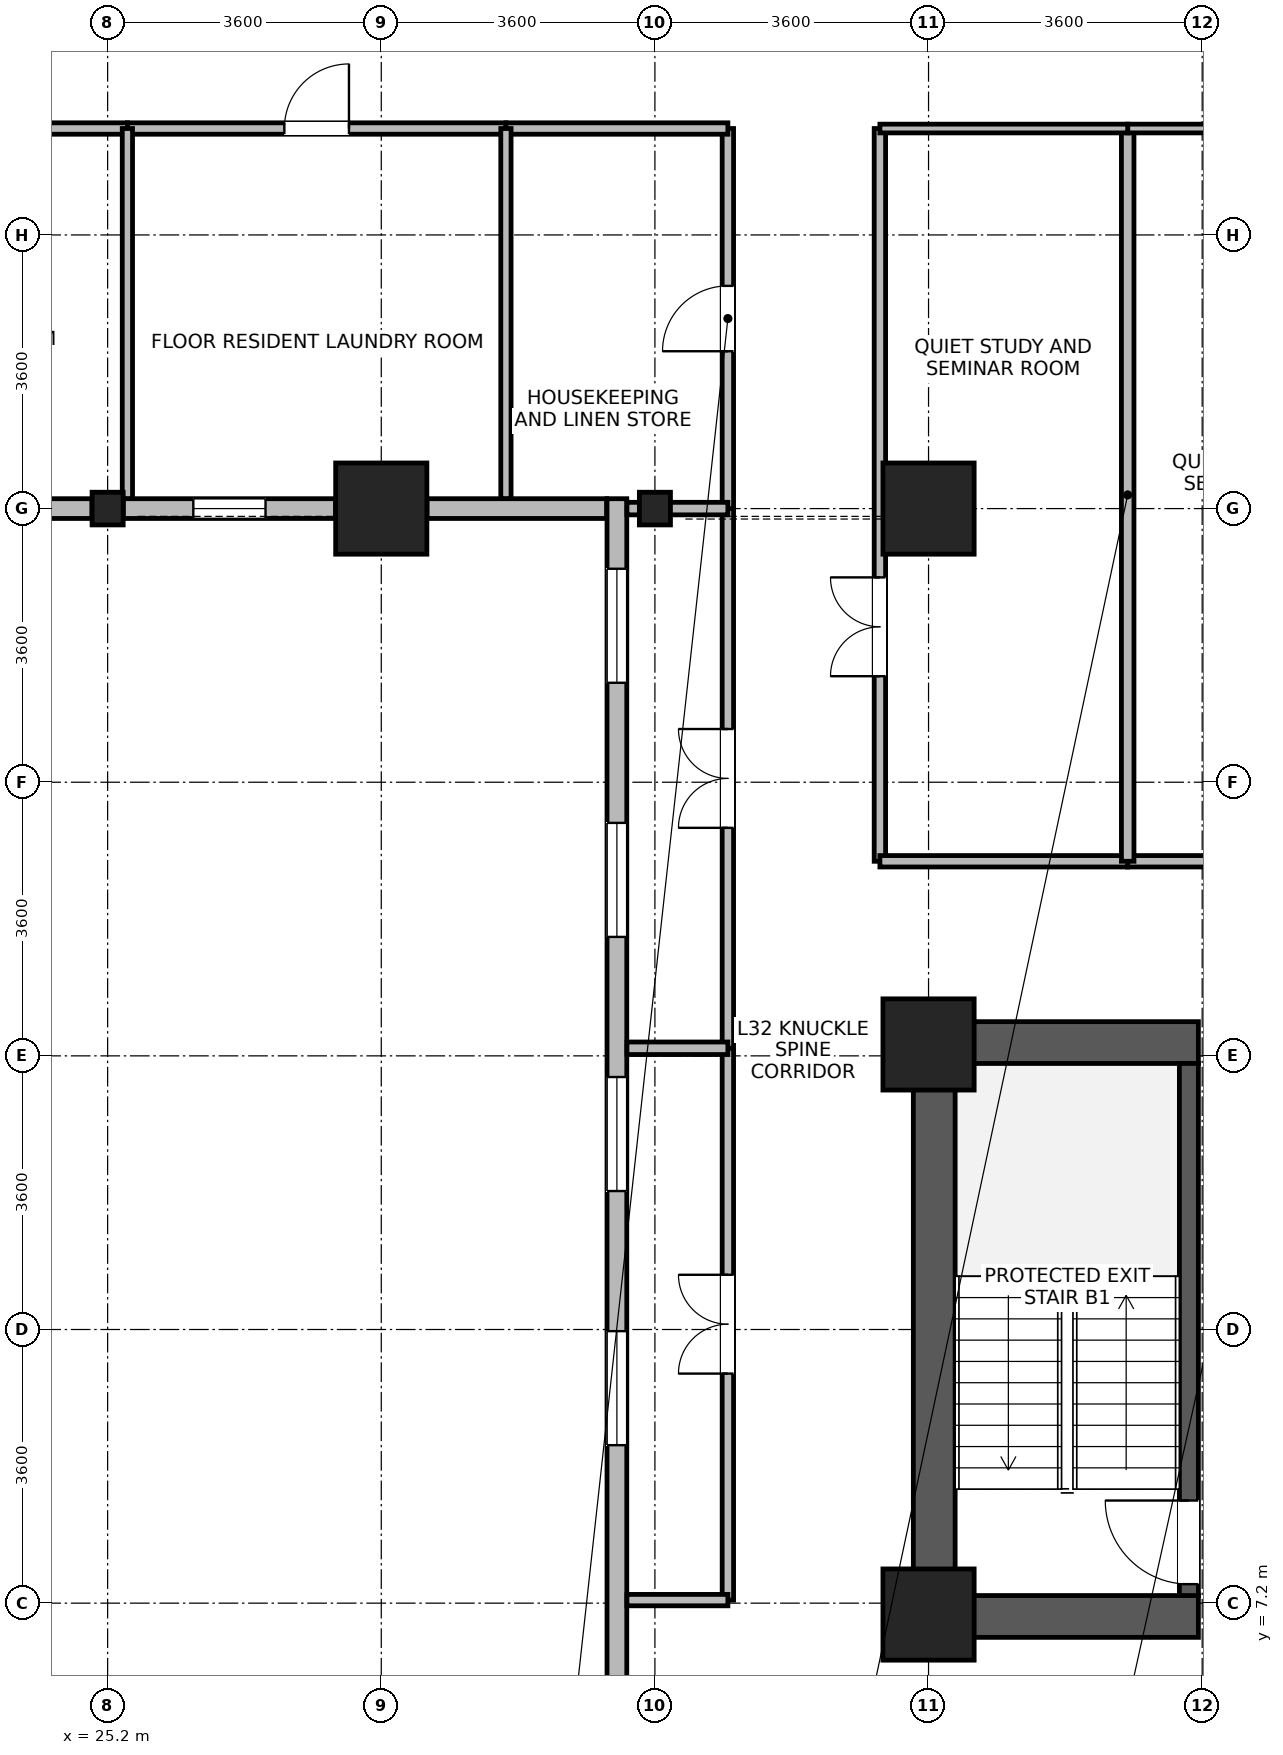
"""IFC4 building model, lengths in metres.
Left out: names, types, materials, properties, quantities, classifications, styles, units other than length and angle.
Written with IfcOpenShell. Run it as: python <this file> out.ifc"""

import sys

from ifc_helpers import new_model, si_unit, direction, frame, frame_2d, origin, origin_2d, place, context, subcontext, project, spatial, rectangle, i_section, extrude, source, transform, mapped, element, fill, save


model = new_model("IFC4")
c1 = context("Model", 3, precision=1e-05, world=origin(), true_north=direction((0.0, 1.0)))
c2 = subcontext(c1, "Body", "Model", "MODEL_VIEW")
j1 = project(units=[si_unit("LENGTHUNIT", "METRE"), si_unit("PLANEANGLEUNIT", "RADIAN")], contexts=[c1])
p1 = place(None, origin())
s1 = spatial("IfcSite", under=j1, at=p1, CompositionType="ELEMENT")
p2 = place(p1, origin())
s2 = spatial("IfcBuilding", under=s1, at=p2, CompositionType="ELEMENT")
p3 = place(p2, frame((0.0, 0.0, 126.7)))
s3 = spatial("IfcBuildingStorey", under=s2, at=p3, CompositionType="ELEMENT", Elevation=126.7)
p4 = place(p3, frame((36.075, 6.75, 0.0), z_axis=(0.0, 0.0, 1.0), x_axis=(0.0, 1.0, 0.0)))
e1 = element("IfcWall", 1, at=p4, inside=s3, PredefinedType="SHEAR", context=c2, shape_type="SweptSolid", body=[
    extrude(rectangle(XDim=8.1, YDim=0.55, at=frame_2d((4.05, 0.0))), origin(), (0.0, 0.0, 1.0), 3.34),
])
for number, where, z_axis, x_axis in (
    (2, (36.35, 7.025, 0.0), (0.0, 0.0, 1.0), (1.0, 0.0, 0.0)),
    (3, (36.35, 14.575, 0.0), (0.0, 0.0, 1.0), (1.0, 0.0, 0.0)),
):
    element("IfcWall", number, at=place(p3, frame(where, z_axis=z_axis, x_axis=x_axis)), inside=s3, PredefinedType="SHEAR", context=c2, shape_type="SweptSolid", body=[
        extrude(rectangle(XDim=3.2, YDim=0.55, at=frame_2d((1.6, 0.0))), origin(), (0.0, 0.0, 1.0), 3.34),
    ])
p5 = place(p3, frame((39.425, 7.3, 0.0), z_axis=(0.0, 0.0, 1.0), x_axis=(0.0, 1.0, 0.0)))
e4 = element("IfcWall", 4, at=p5, inside=s3, PredefinedType="SHEAR", context=c2, shape_type="SweptSolid", body=[
    extrude(rectangle(XDim=7.0, YDim=0.25, at=frame_2d((3.5, 0.0))), origin(), (0.0, 0.0, 1.0), 3.34),
])
p6 = place(p5, frame((0.15, 0.0, 0.0)))
e5 = element("IfcOpeningElement", 5, at=p6, cuts=e4, PredefinedType="OPENING", context=c2, shape_type="SweptSolid", body=[
    extrude(rectangle(XDim=1.1, YDim=2.08, at=frame_2d((0.55, 1.04))), frame((0.0, 0.135, 0.0), z_axis=(0.0, -1.0, 0.0), x_axis=(1.0, 0.0, 0.0)), (0.0, 0.0, 1.0), 0.27),
])
m1 = source(origin(), c2, "Body", "SweptSolid", [
    extrude(rectangle(XDim=1.2, YDim=1.2, at=origin_2d()), origin(), (0.0, 0.0, 1.0), 3.7),
])
for number, where, z_axis, x_axis in (
    (6, (28.8, 21.6, 0.0), (0.0, 0.0, 1.0), (1.0, 0.0, 0.0)),
    (7, (36.0, 21.6, 0.0), (0.0, 0.0, 1.0), (1.0, 0.0, 0.0)),
    (8, (36.0, 7.05, 0.0), (0.0, 0.0, 1.0), (1.0, 0.0, 0.0)),
    (9, (36.0, 14.55, 0.0), (0.0, 0.0, 1.0), (1.0, 0.0, 0.0)),
):
    element("IfcColumn", number, at=place(p3, frame(where, z_axis=z_axis, x_axis=x_axis)), inside=s3, PredefinedType="COLUMN", context=c2, shape_type="MappedRepresentation", body=[
        mapped(m1, transform((0.0, 0.0, 0.0), x_axis=(1.0, 0.0, 0.0), y_axis=(0.0, 1.0, 0.0), z_axis=(0.0, 0.0, 1.0), scale=1.0)),
    ])
m2 = source(origin(), c2, "Body", "SweptSolid", [
    extrude(i_section(OverallWidth=0.409, OverallDepth=0.43, WebThickness=0.024, FlangeThickness=0.033, FilletRadius=0.015, at=origin_2d()), origin(), (0.0, 0.0, 1.0), 3.7),
])
for number, where, z_axis, x_axis in (
    (10, (25.2, 21.6, 0.0), (0.0, 0.0, 1.0), (1.0, 0.0, 0.0)),
    (11, (32.4, 21.6, 0.0), (0.0, 0.0, 1.0), (1.0, 0.0, 0.0)),
):
    element("IfcColumn", number, at=place(p3, frame(where, z_axis=z_axis, x_axis=x_axis)), inside=s3, PredefinedType="COLUMN", context=c2, shape_type="MappedRepresentation", body=[
        mapped(m2, transform((0.0, 0.0, 0.0), x_axis=(1.0, 0.0, 0.0), y_axis=(0.0, 1.0, 0.0), z_axis=(0.0, 0.0, 1.0), scale=1.0)),
    ])
p7 = place(p3, frame((24.994, 21.6, 0.0), z_axis=(0.0, 0.0, 1.0), x_axis=(-1.0, 0.0, 0.0)))
e12 = element("IfcWall", 12, at=p7, inside=s3, PredefinedType="STANDARD", context=c2, shape_type="SweptSolid", body=[
    extrude(rectangle(XDim=2.793, YDim=0.26, at=frame_2d((1.397, 0.0))), origin(), (0.0, 0.0, 1.0), 2.87),
])
p8 = place(p7, frame((0.922, 0.0, 0.85)))
e13 = element("IfcOpeningElement", 13, at=p8, cuts=e12, PredefinedType="OPENING", context=c2, shape_type="SweptSolid", body=[
    extrude(rectangle(XDim=0.95, YDim=1.75, at=frame_2d((0.475, 0.875))), frame((0.0, 0.14, 0.0), z_axis=(0.0, -1.0, 0.0), x_axis=(1.0, 0.0, 0.0)), (0.0, 0.0, 1.0), 0.28),
])
p9 = place(p3, frame((28.199, 21.6, 0.0), z_axis=(0.0, 0.0, 1.0), x_axis=(-1.0, 0.0, 0.0)))
e14 = element("IfcWall", 14, at=p9, inside=s3, PredefinedType="STANDARD", context=c2, shape_type="SweptSolid", body=[
    extrude(rectangle(XDim=2.793, YDim=0.26, at=frame_2d((1.397, 0.0))), origin(), (0.0, 0.0, 1.0), 2.87),
])
p10 = place(p9, frame((0.922, 0.0, 0.85)))
e15 = element("IfcOpeningElement", 15, at=p10, cuts=e14, PredefinedType="OPENING", context=c2, shape_type="SweptSolid", body=[
    extrude(rectangle(XDim=0.95, YDim=1.75, at=frame_2d((0.475, 0.875))), frame((0.0, 0.14, 0.0), z_axis=(0.0, -1.0, 0.0), x_axis=(1.0, 0.0, 0.0)), (0.0, 0.0, 1.0), 0.28),
])
p11 = place(p3, frame((31.765, 21.6, 0.0), z_axis=(0.0, 0.0, 1.0), x_axis=(-1.0, 0.0, 0.0)))
e16 = element("IfcWall", 16, at=p11, inside=s3, PredefinedType="STANDARD", context=c2, shape_type="SweptSolid", body=[
    extrude(rectangle(XDim=2.364, YDim=0.26, at=frame_2d((1.182, 0.0))), origin(), (0.0, 0.0, 1.0), 2.87),
])
p12 = place(p3, frame((31.9, 1.67, 0.0), z_axis=(0.0, 0.0, 1.0), x_axis=(0.0, 1.0, 0.0)))
e17 = element("IfcWall", 17, at=p12, inside=s3, PredefinedType="STANDARD", context=c2, shape_type="SweptSolid", body=[
    extrude(rectangle(XDim=20.06, YDim=0.26, at=frame_2d((10.03, 0.0))), origin(), (0.0, 0.0, 1.0), 3.32),
])
p13 = place(p12, frame((0.922, 0.0, 0.85)))
e18 = element("IfcOpeningElement", 18, at=p13, cuts=e17, PredefinedType="OPENING", context=c2, shape_type="SweptSolid", body=[
    extrude(rectangle(XDim=1.5, YDim=1.85, at=frame_2d((0.75, 0.925))), frame((0.0, 0.14, 0.0), z_axis=(0.0, -1.0, 0.0), x_axis=(1.0, 0.0, 0.0)), (0.0, 0.0, 1.0), 0.28),
])
p14 = place(p12, frame((7.608, 0.0, 0.85)))
e19 = element("IfcOpeningElement", 19, at=p14, cuts=e17, PredefinedType="OPENING", context=c2, shape_type="SweptSolid", body=[
    extrude(rectangle(XDim=1.5, YDim=1.85, at=frame_2d((0.75, 0.925))), frame((0.0, 0.14, 0.0), z_axis=(0.0, -1.0, 0.0), x_axis=(1.0, 0.0, 0.0)), (0.0, 0.0, 1.0), 0.28),
])
p15 = place(p12, frame((10.952, 0.0, 0.85)))
e20 = element("IfcOpeningElement", 20, at=p15, cuts=e17, PredefinedType="OPENING", context=c2, shape_type="SweptSolid", body=[
    extrude(rectangle(XDim=1.5, YDim=1.85, at=frame_2d((0.75, 0.925))), frame((0.0, 0.14, 0.0), z_axis=(0.0, -1.0, 0.0), x_axis=(1.0, 0.0, 0.0)), (0.0, 0.0, 1.0), 0.28),
])
p16 = place(p12, frame((14.295, 0.0, 0.85)))
e21 = element("IfcOpeningElement", 21, at=p16, cuts=e17, PredefinedType="OPENING", context=c2, shape_type="SweptSolid", body=[
    extrude(rectangle(XDim=1.5, YDim=1.85, at=frame_2d((0.75, 0.925))), frame((0.0, 0.14, 0.0), z_axis=(0.0, -1.0, 0.0), x_axis=(1.0, 0.0, 0.0)), (0.0, 0.0, 1.0), 0.28),
])
p17 = place(p12, frame((17.638, 0.0, 0.85)))
e22 = element("IfcOpeningElement", 22, at=p17, cuts=e17, PredefinedType="OPENING", context=c2, shape_type="SweptSolid", body=[
    extrude(rectangle(XDim=1.5, YDim=1.85, at=frame_2d((0.75, 0.925))), frame((0.0, 0.14, 0.0), z_axis=(0.0, -1.0, 0.0), x_axis=(1.0, 0.0, 0.0)), (0.0, 0.0, 1.0), 0.28),
])
p18 = place(p3, frame((35.36, 16.96, 0.0), z_axis=(0.0, 0.0, 1.0), x_axis=(0.0, 1.0, 0.0)))
e23 = element("IfcWall", 23, at=p18, inside=s3, PredefinedType="PARTITIONING", context=c2, shape_type="SweptSolid", body=[
    extrude(rectangle(XDim=9.64, YDim=0.15, at=frame_2d((4.82, 0.0))), origin(), (0.0, 0.0, 1.0), 3.32),
])
p19 = place(p18, frame((2.435, 0.0, 0.0)))
e24 = element("IfcOpeningElement", 24, at=p19, cuts=e23, PredefinedType="OPENING", context=c2, shape_type="SweptSolid", body=[
    extrude(rectangle(XDim=1.3, YDim=2.12, at=frame_2d((0.65, 1.06))), frame((0.0, 0.085, 0.0), z_axis=(0.0, -1.0, 0.0), x_axis=(1.0, 0.0, 0.0)), (0.0, 0.0, 1.0), 0.17),
])
p20 = place(p3, frame((33.36, 7.24, 0.0), z_axis=(0.0, 0.0, 1.0), x_axis=(0.0, 1.0, 0.0)))
e25 = element("IfcWall", 25, at=p20, inside=s3, PredefinedType="PARTITIONING", context=c2, shape_type="SweptSolid", body=[
    extrude(rectangle(XDim=7.26, YDim=0.15, at=frame_2d((3.63, 0.0))), origin(), (0.0, 0.0, 1.0), 3.32),
])
p21 = place(p20, frame((2.98, 0.0, 0.0)))
e26 = element("IfcOpeningElement", 26, at=p21, cuts=e25, PredefinedType="OPENING", context=c2, shape_type="SweptSolid", body=[
    extrude(rectangle(XDim=1.3, YDim=2.12, at=frame_2d((0.65, 1.06))), frame((0.0, 0.085, 0.0), z_axis=(0.0, -1.0, 0.0), x_axis=(1.0, 0.0, 0.0)), (0.0, 0.0, 1.0), 0.17),
])
p22 = place(p3, frame((33.36, 14.5, 0.0), z_axis=(0.0, 0.0, 1.0), x_axis=(0.0, 1.0, 0.0)))
e27 = element("IfcWall", 27, at=p22, inside=s3, PredefinedType="PARTITIONING", context=c2, shape_type="SweptSolid", body=[
    extrude(rectangle(XDim=7.1, YDim=0.15, at=frame_2d((3.55, 0.0))), origin(), (0.0, 0.0, 1.0), 3.32),
])
p23 = place(p22, frame((2.9, 0.0, 0.0)))
e28 = element("IfcOpeningElement", 28, at=p23, cuts=e27, PredefinedType="OPENING", context=c2, shape_type="SweptSolid", body=[
    extrude(rectangle(XDim=1.3, YDim=2.12, at=frame_2d((0.65, 1.06))), frame((0.0, 0.085, 0.0), z_axis=(0.0, -1.0, 0.0), x_axis=(1.0, 0.0, 0.0)), (0.0, 0.0, 1.0), 0.17),
])
p24 = place(p3, frame((19.12, 26.6, 0.0), z_axis=(0.0, 0.0, 1.0), x_axis=(1.0, 0.0, 0.0)))
e29 = element("IfcWall", 29, at=p24, inside=s3, PredefinedType="PARTITIONING", context=c2, shape_type="SweptSolid", body=[
    extrude(rectangle(XDim=6.34, YDim=0.15, at=frame_2d((3.17, 0.0))), origin(), (0.0, 0.0, 1.0), 3.32),
])
p25 = place(p24, frame((2.52, 0.0, 0.0)))
e30 = element("IfcOpeningElement", 30, at=p25, cuts=e29, PredefinedType="OPENING", context=c2, shape_type="SweptSolid", body=[
    extrude(rectangle(XDim=1.3, YDim=2.12, at=frame_2d((0.65, 1.06))), frame((0.0, 0.085, 0.0), z_axis=(0.0, -1.0, 0.0), x_axis=(1.0, 0.0, 0.0)), (0.0, 0.0, 1.0), 0.17),
])
p26 = place(p3, frame((33.36, 21.6, 0.0), z_axis=(0.0, 0.0, 1.0), x_axis=(0.0, 1.0, 0.0)))
e31 = element("IfcWall", 31, at=p26, inside=s3, PredefinedType="PARTITIONING", context=c2, shape_type="SweptSolid", body=[
    extrude(rectangle(XDim=5.0, YDim=0.15, at=frame_2d((2.5, 0.0))), origin(), (0.0, 0.0, 1.0), 3.32),
])
p27 = place(p26, frame((2.07, 0.0, 0.0)))
e32 = element("IfcOpeningElement", 32, at=p27, cuts=e31, PredefinedType="OPENING", context=c2, shape_type="SweptSolid", body=[
    extrude(rectangle(XDim=0.86, YDim=2.02, at=frame_2d((0.43, 1.01))), frame((0.0, 0.085, 0.0), z_axis=(0.0, -1.0, 0.0), x_axis=(1.0, 0.0, 0.0)), (0.0, 0.0, 1.0), 0.17),
])
p28 = place(p3, frame((25.46, 26.6, 0.0), z_axis=(0.0, 0.0, 1.0), x_axis=(1.0, 0.0, 0.0)))
e33 = element("IfcWall", 33, at=p28, inside=s3, PredefinedType="PARTITIONING", context=c2, shape_type="SweptSolid", body=[
    extrude(rectangle(XDim=4.98, YDim=0.15, at=frame_2d((2.49, 0.0))), origin(), (0.0, 0.0, 1.0), 3.32),
])
p29 = place(p28, frame((2.065, 0.0, 0.0)))
e34 = element("IfcOpeningElement", 34, at=p29, cuts=e33, PredefinedType="OPENING", context=c2, shape_type="SweptSolid", body=[
    extrude(rectangle(XDim=0.85, YDim=2.04, at=frame_2d((0.425, 1.02))), frame((0.0, 0.085, 0.0), z_axis=(0.0, -1.0, 0.0), x_axis=(1.0, 0.0, 0.0)), (0.0, 0.0, 1.0), 0.17),
])
p30 = place(p3, frame((38.62, 16.96, 0.0), z_axis=(0.0, 0.0, 1.0), x_axis=(1.0, 0.0, 0.0)))
e35 = element("IfcWall", 35, at=p30, inside=s3, PredefinedType="PARTITIONING", context=c2, shape_type="SweptSolid", body=[
    extrude(rectangle(XDim=3.52, YDim=0.15, at=frame_2d((1.76, 0.0))), origin(), (0.0, 0.0, 1.0), 3.32),
])
p31 = place(p30, frame((1.11, 0.0, 0.0)))
e36 = element("IfcOpeningElement", 36, at=p31, cuts=e35, PredefinedType="OPENING", context=c2, shape_type="SweptSolid", body=[
    extrude(rectangle(XDim=1.3, YDim=2.12, at=frame_2d((0.65, 1.06))), frame((0.0, 0.085, 0.0), z_axis=(0.0, -1.0, 0.0), x_axis=(1.0, 0.0, 0.0)), (0.0, 0.0, 1.0), 0.17),
])
p32 = place(p3, frame((35.36, 16.96, 0.0), z_axis=(0.0, 0.0, 1.0), x_axis=(1.0, 0.0, 0.0)))
e37 = element("IfcWall", 37, at=p32, inside=s3, PredefinedType="PARTITIONING", context=c2, shape_type="SweptSolid", body=[
    extrude(rectangle(XDim=3.26, YDim=0.15, at=frame_2d((1.63, 0.0))), origin(), (0.0, 0.0, 1.0), 3.32),
])
p33 = place(p3, frame((30.44, 26.6, 0.0), z_axis=(0.0, 0.0, 1.0), x_axis=(1.0, 0.0, 0.0)))
e38 = element("IfcWall", 38, at=p33, inside=s3, PredefinedType="PARTITIONING", context=c2, shape_type="SweptSolid", body=[
    extrude(rectangle(XDim=2.92, YDim=0.15, at=frame_2d((1.46, 0.0))), origin(), (0.0, 0.0, 1.0), 3.32),
])
p34 = place(p3, frame((32.032, 7.24, 0.0), z_axis=(0.0, 0.0, 1.0), x_axis=(1.0, 0.0, 0.0)))
e39 = element("IfcWall", 39, at=p34, inside=s3, PredefinedType="PARTITIONING", context=c2, shape_type="SweptSolid", body=[
    extrude(rectangle(XDim=1.328, YDim=0.15, at=frame_2d((0.664, 0.0))), origin(), (0.0, 0.0, 1.0), 3.32),
])
p35 = place(p3, frame((38.62, 16.96, 0.0), z_axis=(0.0, 0.0, 1.0), x_axis=(0.0, 1.0, 0.0)))
e40 = element("IfcWall", 40, at=p35, inside=s3, PredefinedType="PARTITIONING", context=c2, shape_type="SweptSolid", body=[
    extrude(rectangle(XDim=9.64, YDim=0.165, at=frame_2d((4.82, 0.0))), origin(), (0.0, 0.0, 1.0), 3.32),
])
for number, where, z_axis, x_axis in (
    (41, (25.46, 21.732, 0.0), (0.0, 0.0, 1.0), (0.0, 1.0, 0.0)),
    (42, (30.44, 21.732, 0.0), (0.0, 0.0, 1.0), (0.0, 1.0, 0.0)),
):
    element("IfcWall", number, at=place(p3, frame(where, z_axis=z_axis, x_axis=x_axis)), inside=s3, PredefinedType="PARTITIONING", context=c2, shape_type="SweptSolid", body=[
        extrude(rectangle(XDim=4.868, YDim=0.135, at=frame_2d((2.434, 0.0))), origin(), (0.0, 0.0, 1.0), 3.32),
    ])
p36 = place(p3, frame((38.62, 26.6, 0.0), z_axis=(0.0, 0.0, 1.0), x_axis=(1.0, 0.0, 0.0)))
e43 = element("IfcWall", 43, at=p36, inside=s3, PredefinedType="PARTITIONING", context=c2, shape_type="SweptSolid", body=[
    extrude(rectangle(XDim=3.52, YDim=0.115, at=frame_2d((1.76, 0.0))), origin(), (0.0, 0.0, 1.0), 3.32),
])
p37 = place(p3, frame((35.36, 26.6, 0.0), z_axis=(0.0, 0.0, 1.0), x_axis=(1.0, 0.0, 0.0)))
e44 = element("IfcWall", 44, at=p37, inside=s3, PredefinedType="PARTITIONING", context=c2, shape_type="SweptSolid", body=[
    extrude(rectangle(XDim=3.26, YDim=0.115, at=frame_2d((1.63, 0.0))), origin(), (0.0, 0.0, 1.0), 3.32),
])
p38 = place(p3, frame((32.032, 14.5, 0.0), z_axis=(0.0, 0.0, 1.0), x_axis=(1.0, 0.0, 0.0)))
e45 = element("IfcWall", 45, at=p38, inside=s3, PredefinedType="PARTITIONING", context=c2, shape_type="SweptSolid", body=[
    extrude(rectangle(XDim=1.328, YDim=0.165, at=frame_2d((0.664, 0.0))), origin(), (0.0, 0.0, 1.0), 3.32),
])
p39 = place(p3, frame((32.032, 21.6, 0.0), z_axis=(0.0, 0.0, 1.0), x_axis=(1.0, 0.0, 0.0)))
e46 = element("IfcWall", 46, at=p39, inside=s3, PredefinedType="PARTITIONING", context=c2, shape_type="SweptSolid", body=[
    extrude(rectangle(XDim=1.328, YDim=0.165, at=frame_2d((0.664, 0.0))), origin(), (0.0, 0.0, 1.0), 2.87),
])
p40 = place(p10, origin())
e47 = element("IfcWindow", 47, at=p40, inside=s3, PartitioningType="SINGLE_PANEL", PredefinedType="WINDOW", context=c2, shape_type="SweptSolid", body=[
    extrude(rectangle(XDim=0.95, YDim=1.75, at=frame_2d((0.475, 0.875))), frame((0.0, 0.03, 0.0), z_axis=(0.0, -1.0, 0.0), x_axis=(1.0, 0.0, 0.0)), (0.0, 0.0, 1.0), 0.06),
])
fill(e15, e47)
p41 = place(p14, origin())
e48 = element("IfcWindow", 48, at=p41, inside=s3, PartitioningType="SINGLE_PANEL", PredefinedType="WINDOW", context=c2, shape_type="SweptSolid", body=[
    extrude(rectangle(XDim=1.5, YDim=1.85, at=frame_2d((0.75, 0.925))), frame((0.0, 0.03, 0.0), z_axis=(0.0, -1.0, 0.0), x_axis=(1.0, 0.0, 0.0)), (0.0, 0.0, 1.0), 0.06),
])
fill(e19, e48)
p42 = place(p15, origin())
e49 = element("IfcWindow", 49, at=p42, inside=s3, PartitioningType="SINGLE_PANEL", PredefinedType="WINDOW", context=c2, shape_type="SweptSolid", body=[
    extrude(rectangle(XDim=1.5, YDim=1.85, at=frame_2d((0.75, 0.925))), frame((0.0, 0.03, 0.0), z_axis=(0.0, -1.0, 0.0), x_axis=(1.0, 0.0, 0.0)), (0.0, 0.0, 1.0), 0.06),
])
fill(e20, e49)
p43 = place(p16, origin())
e50 = element("IfcWindow", 50, at=p43, inside=s3, PartitioningType="SINGLE_PANEL", PredefinedType="WINDOW", context=c2, shape_type="SweptSolid", body=[
    extrude(rectangle(XDim=1.5, YDim=1.85, at=frame_2d((0.75, 0.925))), frame((0.0, 0.03, 0.0), z_axis=(0.0, -1.0, 0.0), x_axis=(1.0, 0.0, 0.0)), (0.0, 0.0, 1.0), 0.06),
])
fill(e21, e50)
p44 = place(p17, origin())
e51 = element("IfcWindow", 51, at=p44, inside=s3, PartitioningType="SINGLE_PANEL", PredefinedType="WINDOW", context=c2, shape_type="SweptSolid", body=[
    extrude(rectangle(XDim=1.5, YDim=1.85, at=frame_2d((0.75, 0.925))), frame((0.0, 0.03, 0.0), z_axis=(0.0, -1.0, 0.0), x_axis=(1.0, 0.0, 0.0)), (0.0, 0.0, 1.0), 0.06),
])
fill(e22, e51)
p45 = place(p6, origin())
e52 = element("IfcDoor", 52, at=p45, inside=s3, OperationType="SINGLE_SWING_RIGHT", PredefinedType="DOOR", context=c2, shape_type="SweptSolid", body=[
    extrude(rectangle(XDim=1.1, YDim=2.08, at=frame_2d((0.55, 1.04))), frame((0.0, 0.025, 0.0), z_axis=(0.0, -1.0, 0.0), x_axis=(1.0, 0.0, 0.0)), (0.0, 0.0, 1.0), 0.05),
])
fill(e5, e52)
p46 = place(p19, origin())
e53 = element("IfcDoor", 53, at=p46, inside=s3, OperationType="DOUBLE_DOOR_SINGLE_SWING", PredefinedType="DOOR", context=c2, shape_type="SweptSolid", body=[
    extrude(rectangle(XDim=1.3, YDim=2.12, at=frame_2d((0.65, 1.06))), frame((0.0, 0.025, 0.0), z_axis=(0.0, -1.0, 0.0), x_axis=(1.0, 0.0, 0.0)), (0.0, 0.0, 1.0), 0.05),
])
fill(e24, e53)
p47 = place(p21, origin())
e54 = element("IfcDoor", 54, at=p47, inside=s3, OperationType="DOUBLE_DOOR_SINGLE_SWING", PredefinedType="DOOR", context=c2, shape_type="SweptSolid", body=[
    extrude(rectangle(XDim=1.3, YDim=2.12, at=frame_2d((0.65, 1.06))), frame((0.0, 0.025, 0.0), z_axis=(0.0, -1.0, 0.0), x_axis=(1.0, 0.0, 0.0)), (0.0, 0.0, 1.0), 0.05),
])
fill(e26, e54)
p48 = place(p23, origin())
e55 = element("IfcDoor", 55, at=p48, inside=s3, OperationType="DOUBLE_DOOR_SINGLE_SWING", PredefinedType="DOOR", context=c2, shape_type="SweptSolid", body=[
    extrude(rectangle(XDim=1.3, YDim=2.12, at=frame_2d((0.65, 1.06))), frame((0.0, 0.025, 0.0), z_axis=(0.0, -1.0, 0.0), x_axis=(1.0, 0.0, 0.0)), (0.0, 0.0, 1.0), 0.05),
])
fill(e28, e55)
p49 = place(p27, origin())
e56 = element("IfcDoor", 56, at=p49, inside=s3, OperationType="SINGLE_SWING_LEFT", PredefinedType="DOOR", context=c2, shape_type="SweptSolid", body=[
    extrude(rectangle(XDim=0.86, YDim=2.02, at=frame_2d((0.43, 1.01))), frame((0.0, 0.025, 0.0), z_axis=(0.0, -1.0, 0.0), x_axis=(1.0, 0.0, 0.0)), (0.0, 0.0, 1.0), 0.05),
])
fill(e32, e56)
p50 = place(p29, origin())
e57 = element("IfcDoor", 57, at=p50, inside=s3, OperationType="SINGLE_SWING_RIGHT", PredefinedType="DOOR", context=c2, shape_type="SweptSolid", body=[
    extrude(rectangle(XDim=0.85, YDim=2.04, at=frame_2d((0.425, 1.02))), frame((0.0, 0.025, 0.0), z_axis=(0.0, -1.0, 0.0), x_axis=(1.0, 0.0, 0.0)), (0.0, 0.0, 1.0), 0.05),
])
fill(e34, e57)
save(model, sys.argv[1])
